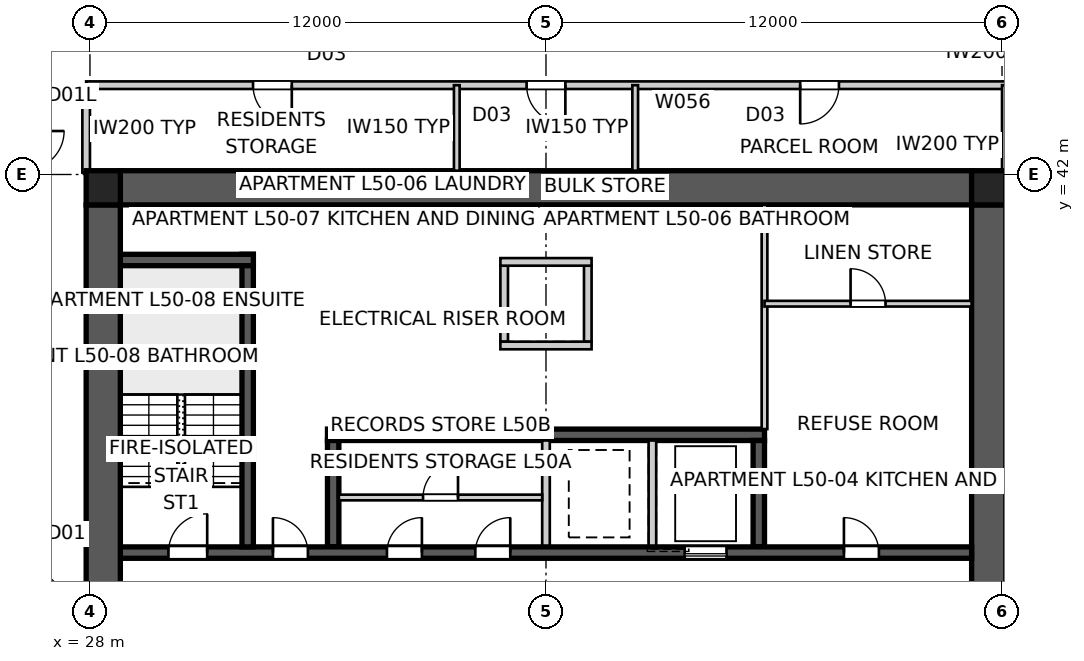
"""IFC4 building model, lengths in metres.
Left out: names, types, materials, properties, quantities, classifications, styles, units other than length and angle.
Written with IfcOpenShell. Run it as: python <this file> out.ifc"""

import sys

from ifc_helpers import new_model, si_unit, direction, frame, frame_2d, origin, origin_2d, place, context, subcontext, project, spatial, polyline, rectangle, outline, extrude, element, fill, save


model = new_model("IFC4")
c1 = context("Model", 3, precision=1e-05, world=origin(), true_north=direction((0.0, 1.0)))
c2 = subcontext(c1, "Body", "Model", "MODEL_VIEW")
j1 = project(units=[si_unit("LENGTHUNIT", "METRE"), si_unit("PLANEANGLEUNIT", "RADIAN")], contexts=[c1])
p1 = place(None, origin())
s1 = spatial("IfcSite", under=j1, at=p1, CompositionType="ELEMENT")
p2 = place(p1, origin())
s2 = spatial("IfcBuilding", under=s1, at=p2, CompositionType="ELEMENT")
p3 = place(p2, frame((0.0, 0.0, 182.8)))
s3 = spatial("IfcBuildingStorey", under=s2, at=p3, CompositionType="ELEMENT", Elevation=182.8)
p4 = place(p3, frame((28.8, 41.65, 0.0), z_axis=(0.0, 0.0, 1.0), x_axis=(1.0, 0.0, 0.0)))
e1 = element("IfcWall", 1, at=p4, inside=s3, PredefinedType="SHEAR", context=c2, shape_type="SweptSolid", body=[
    extrude(outline(polyline([(0.0, -0.45), (22.4, -0.45), (22.4, -0.025), (22.85, -0.025), (22.85, 0.025), (22.4, 0.025), (22.4, 0.45), (0.0, 0.45), (0.0, 0.025), (-0.45, 0.025), (-0.45, -0.025), (0.0, -0.025), (0.0, -0.45)])), origin(), (0.0, 0.0, 1.0), 3.4),
])
p5 = place(p3, frame((51.65, 18.8, 0.0), z_axis=(0.0, 0.0, 1.0), x_axis=(0.0, 1.0, 0.0)))
e2 = element("IfcWall", 2, at=p5, inside=s3, PredefinedType="SHEAR", context=c2, shape_type="SweptSolid", body=[
    extrude(outline(polyline([(0.0, -0.45), (22.4, -0.45), (22.4, -0.025), (22.85, -0.025), (22.85, 0.025), (22.4, 0.025), (22.4, 0.45), (0.0, 0.45), (0.0, 0.025), (-0.45, 0.025), (-0.45, -0.025), (0.0, -0.025), (0.0, -0.45)])), origin(), (0.0, 0.0, 1.0), 3.4),
])
p6 = place(p5, frame((11.14, 0.0, 0.0)))
e3 = element("IfcOpeningElement", 3, at=p6, cuts=e2, PredefinedType="OPENING", context=c2, shape_type="SweptSolid", body=[
    extrude(rectangle(XDim=1.02, YDim=2.4, at=frame_2d((0.51, 1.2))), frame((0.0, 0.46, 0.0), z_axis=(0.0, -1.0, 0.0), x_axis=(1.0, 0.0, 0.0)), (0.0, 0.0, 1.0), 0.92),
])
p7 = place(p3, frame((28.35, 41.2, 0.0), z_axis=(0.0, 0.0, 1.0), x_axis=(0.0, -1.0, 0.0)))
e4 = element("IfcWall", 4, at=p7, inside=s3, PredefinedType="SHEAR", context=c2, shape_type="SweptSolid", body=[
    extrude(outline(polyline([(0.0, -0.45), (22.4, -0.45), (22.4, -0.025), (22.85, -0.025), (22.85, 0.025), (22.4, 0.025), (22.4, 0.45), (0.0, 0.45), (0.0, 0.025), (-0.45, 0.025), (-0.45, -0.025), (0.0, -0.025), (0.0, -0.45)])), origin(), (0.0, 0.0, 1.0), 3.4),
])
p8 = place(p7, frame((11.14, 0.0, 0.0)))
e5 = element("IfcOpeningElement", 5, at=p8, cuts=e4, PredefinedType="OPENING", context=c2, shape_type="SweptSolid", body=[
    extrude(rectangle(XDim=1.02, YDim=2.4, at=frame_2d((0.51, 1.2))), frame((0.0, 0.46, 0.0), z_axis=(0.0, -1.0, 0.0), x_axis=(1.0, 0.0, 0.0)), (0.0, 0.0, 1.0), 0.92),
])
p9 = place(p3, frame((28.8, 32.05, 0.0), z_axis=(0.0, 0.0, 1.0), x_axis=(1.0, 0.0, 0.0)))
e6 = element("IfcWall", 6, at=p9, inside=s3, PredefinedType="SHEAR", context=c2, shape_type="SweptSolid", body=[
    extrude(rectangle(XDim=22.4, YDim=0.3, at=frame_2d((11.2, 0.0))), origin(), (0.0, 0.0, 1.0), 3.4),
])
p10 = place(p9, frame((19.04, 0.0, 0.0)))
e7 = element("IfcOpeningElement", 7, at=p10, cuts=e6, PredefinedType="OPENING", context=c2, shape_type="SweptSolid", body=[
    extrude(rectangle(XDim=0.92, YDim=2.1, at=frame_2d((0.46, 1.05))), frame((0.0, 0.16, 0.0), z_axis=(0.0, -1.0, 0.0), x_axis=(1.0, 0.0, 0.0)), (0.0, 0.0, 1.0), 0.32),
])
p11 = place(p9, frame((1.265, 0.0, 0.0)))
e8 = element("IfcOpeningElement", 8, at=p11, cuts=e6, PredefinedType="OPENING", context=c2, shape_type="SweptSolid", body=[
    extrude(rectangle(XDim=1.02, YDim=2.1, at=frame_2d((0.51, 1.05))), frame((0.0, 0.16, 0.0), z_axis=(0.0, -1.0, 0.0), x_axis=(1.0, 0.0, 0.0)), (0.0, 0.0, 1.0), 0.32),
])
p12 = place(p9, frame((4.015, 0.0, 0.0)))
e9 = element("IfcOpeningElement", 9, at=p12, cuts=e6, PredefinedType="OPENING", context=c2, shape_type="SweptSolid", body=[
    extrude(rectangle(XDim=0.92, YDim=2.1, at=frame_2d((0.46, 1.05))), frame((0.0, 0.16, 0.0), z_axis=(0.0, -1.0, 0.0), x_axis=(1.0, 0.0, 0.0)), (0.0, 0.0, 1.0), 0.32),
])
p13 = place(p9, frame((7.015, 0.0, 0.0)))
e10 = element("IfcOpeningElement", 10, at=p13, cuts=e6, PredefinedType="OPENING", context=c2, shape_type="SweptSolid", body=[
    extrude(rectangle(XDim=0.92, YDim=2.1, at=frame_2d((0.46, 1.05))), frame((0.0, 0.16, 0.0), z_axis=(0.0, -1.0, 0.0), x_axis=(1.0, 0.0, 0.0)), (0.0, 0.0, 1.0), 0.32),
])
p14 = place(p9, frame((9.34, 0.0, 0.0)))
e11 = element("IfcOpeningElement", 11, at=p14, cuts=e6, PredefinedType="OPENING", context=c2, shape_type="SweptSolid", body=[
    extrude(rectangle(XDim=0.92, YDim=2.1, at=frame_2d((0.46, 1.05))), frame((0.0, 0.16, 0.0), z_axis=(0.0, -1.0, 0.0), x_axis=(1.0, 0.0, 0.0)), (0.0, 0.0, 1.0), 0.32),
])
p15 = place(p9, frame((14.85, 0.0, 0.0)))
e12 = element("IfcOpeningElement", 12, at=p15, cuts=e6, PredefinedType="OPENING", context=c2, shape_type="SweptSolid", body=[
    extrude(rectangle(XDim=1.1, YDim=2.1, at=frame_2d((0.55, 1.05))), frame((0.0, 0.16, 0.0), z_axis=(0.0, -1.0, 0.0), x_axis=(1.0, 0.0, 0.0)), (0.0, 0.0, 1.0), 0.32),
])
p16 = place(p3, frame((34.25, 35.15, 0.0), z_axis=(0.0, 0.0, 1.0), x_axis=(1.0, 0.0, 0.0)))
e13 = element("IfcWall", 13, at=p16, inside=s3, PredefinedType="SHEAR", context=c2, shape_type="SweptSolid", body=[
    extrude(rectangle(XDim=11.5, YDim=0.3, at=frame_2d((5.75, 0.0))), origin(), (0.0, 0.0, 1.0), 3.4),
])
p17 = place(p3, frame((34.4, 32.2, 0.0), z_axis=(0.0, 0.0, 1.0), x_axis=(0.0, 1.0, 0.0)))
e14 = element("IfcWall", 14, at=p17, inside=s3, PredefinedType="SHEAR", context=c2, shape_type="SweptSolid", body=[
    extrude(rectangle(XDim=2.8, YDim=0.3, at=frame_2d((1.4, 0.0))), origin(), (0.0, 0.0, 1.0), 3.4),
])
for number, where, z_axis, x_axis in (
    (15, (40.0, 32.2, 0.0), (0.0, 0.0, 1.0), (0.0, 1.0, 0.0)),
    (16, (42.8, 32.2, 0.0), (0.0, 0.0, 1.0), (0.0, 1.0, 0.0)),
):
    element("IfcWall", number, at=place(p3, frame(where, z_axis=z_axis, x_axis=x_axis)), inside=s3, PredefinedType="SOLIDWALL", context=c2, shape_type="SweptSolid", body=[
        extrude(rectangle(XDim=2.8, YDim=0.2, at=frame_2d((1.4, 0.0))), origin(), (0.0, 0.0, 1.0), 3.4),
    ])
p18 = place(p3, frame((45.6, 32.2, 0.0), z_axis=(0.0, 0.0, 1.0), x_axis=(0.0, 1.0, 0.0)))
e17 = element("IfcWall", 17, at=p18, inside=s3, PredefinedType="SHEAR", context=c2, shape_type="SweptSolid", body=[
    extrude(rectangle(XDim=2.8, YDim=0.3, at=frame_2d((1.4, 0.0))), origin(), (0.0, 0.0, 1.0), 3.4),
])
p19 = place(p3, frame((32.15, 32.2, 0.0), z_axis=(0.0, 0.0, 1.0), x_axis=(0.0, 1.0, 0.0)))
e18 = element("IfcWall", 18, at=p19, inside=s3, PredefinedType="SHEAR", context=c2, shape_type="SweptSolid", body=[
    extrude(rectangle(XDim=7.7, YDim=0.3, at=frame_2d((3.85, 0.0))), origin(), (0.0, 0.0, 1.0), 3.4),
])
p20 = place(p3, frame((28.8, 39.75, 0.0), z_axis=(0.0, 0.0, 1.0), x_axis=(1.0, 0.0, 0.0)))
e19 = element("IfcWall", 19, at=p20, inside=s3, PredefinedType="SHEAR", context=c2, shape_type="SweptSolid", body=[
    extrude(rectangle(XDim=3.5, YDim=0.3, at=frame_2d((1.75, 0.0))), origin(), (0.0, 0.0, 1.0), 3.4),
])
for number, where, z_axis, x_axis in (
    (20, (38.9, 37.6, 0.0), (0.0, 0.0, 1.0), (0.0, 1.0, 0.0)),
    (21, (41.1, 37.6, 0.0), (0.0, 0.0, 1.0), (0.0, 1.0, 0.0)),
):
    element("IfcWall", number, at=place(p3, frame(where, z_axis=z_axis, x_axis=x_axis)), inside=s3, PredefinedType="SOLIDWALL", context=c2, shape_type="SweptSolid", body=[
        extrude(rectangle(XDim=2.0, YDim=0.2, at=frame_2d((1.0, 0.0))), origin(), (0.0, 0.0, 1.0), 3.4),
    ])
for number, where, z_axis, x_axis in (
    (22, (38.8, 37.5, 0.0), (0.0, 0.0, 1.0), (1.0, 0.0, 0.0)),
    (23, (38.8, 39.7, 0.0), (0.0, 0.0, 1.0), (1.0, 0.0, 0.0)),
):
    element("IfcWall", number, at=place(p3, frame(where, z_axis=z_axis, x_axis=x_axis)), inside=s3, PredefinedType="SOLIDWALL", context=c2, shape_type="SweptSolid", body=[
        extrude(rectangle(XDim=2.4, YDim=0.2, at=frame_2d((1.2, 0.0))), origin(), (0.0, 0.0, 1.0), 3.4),
    ])
for number, where, z_axis, x_axis in (
    (24, (51.65, 41.65, 0.0), (0.0, 0.0, 1.0), (1.0, 0.0, 0.0)),
    (25, (28.35, 41.65, 0.0), (0.0, 0.0, 1.0), (1.0, 0.0, 0.0)),
):
    element("IfcColumn", number, at=place(p3, frame(where, z_axis=z_axis, x_axis=x_axis)), inside=s3, PredefinedType="COLUMN", context=c2, shape_type="SweptSolid", body=[
        extrude(rectangle(XDim=0.9, YDim=0.9, at=origin_2d()), origin(), (0.0, 0.0, 1.0), 3.4),
    ])
p21 = place(p3, frame((45.75, 41.2, 0.0), z_axis=(0.0, 0.0, 1.0), x_axis=(0.0, -1.0, 0.0)))
e26 = element("IfcWall", 26, at=p21, inside=s3, PredefinedType="SOLIDWALL", context=c2, shape_type="SweptSolid", body=[
    extrude(rectangle(XDim=5.9, YDim=0.15, at=frame_2d((2.95, 0.0))), origin(), (0.0, 0.0, 1.0), 3.25),
])
p22 = place(p3, frame((45.75, 38.6, 0.0), z_axis=(0.0, 0.0, 1.0), x_axis=(1.0, 0.0, 0.0)))
e27 = element("IfcWall", 27, at=p22, inside=s3, PredefinedType="SOLIDWALL", context=c2, shape_type="SweptSolid", body=[
    extrude(rectangle(XDim=5.45, YDim=0.15, at=frame_2d((2.725, 0.0))), origin(), (0.0, 0.0, 1.0), 3.25),
])
p23 = place(p22, frame((2.265, 0.0, 0.0)))
e28 = element("IfcOpeningElement", 28, at=p23, cuts=e27, PredefinedType="OPENING", context=c2, shape_type="SweptSolid", body=[
    extrude(rectangle(XDim=0.92, YDim=2.1, at=frame_2d((0.46, 1.05))), frame((0.0, 0.085, 0.0), z_axis=(0.0, -1.0, 0.0), x_axis=(1.0, 0.0, 0.0)), (0.0, 0.0, 1.0), 0.17),
])
p24 = place(p3, frame((52.1, 44.35, 0.0), z_axis=(0.0, 0.0, 1.0), x_axis=(-1.0, 0.0, 0.0)))
e29 = element("IfcWall", 29, at=p24, inside=s3, PredefinedType="PARTITIONING", context=c2, shape_type="SweptSolid", body=[
    extrude(rectangle(XDim=24.2, YDim=0.2, at=frame_2d((12.1, 0.0))), origin(), (0.0, 0.0, 1.0), 3.25),
])
p25 = place(p24, frame((18.789, 0.0, 0.0)))
e30 = element("IfcOpeningElement", 30, at=p25, cuts=e29, PredefinedType="OPENING", context=c2, shape_type="SweptSolid", body=[
    extrude(rectangle(XDim=1.02, YDim=2.1, at=frame_2d((0.51, 1.05))), frame((0.0, 0.11, 0.0), z_axis=(0.0, -1.0, 0.0), x_axis=(1.0, 0.0, 0.0)), (0.0, 0.0, 1.0), 0.22),
])
p26 = place(p24, frame((4.391, 0.0, 0.0)))
e31 = element("IfcOpeningElement", 31, at=p26, cuts=e29, PredefinedType="OPENING", context=c2, shape_type="SweptSolid", body=[
    extrude(rectangle(XDim=1.02, YDim=2.1, at=frame_2d((0.51, 1.05))), frame((0.0, 0.11, 0.0), z_axis=(0.0, -1.0, 0.0), x_axis=(1.0, 0.0, 0.0)), (0.0, 0.0, 1.0), 0.22),
])
p27 = place(p24, frame((11.59, 0.0, 0.0)))
e32 = element("IfcOpeningElement", 32, at=p27, cuts=e29, PredefinedType="OPENING", context=c2, shape_type="SweptSolid", body=[
    extrude(rectangle(XDim=1.02, YDim=2.1, at=frame_2d((0.51, 1.05))), frame((0.0, 0.11, 0.0), z_axis=(0.0, -1.0, 0.0), x_axis=(1.0, 0.0, 0.0)), (0.0, 0.0, 1.0), 0.22),
])
p28 = place(p3, frame((27.9, 44.35, 0.0), z_axis=(0.0, 0.0, 1.0), x_axis=(0.0, -1.0, 0.0)))
e33 = element("IfcWall", 33, at=p28, inside=s3, PredefinedType="PARTITIONING", context=c2, shape_type="SweptSolid", body=[
    extrude(rectangle(XDim=2.3, YDim=0.2, at=frame_2d((1.15, 0.0))), origin(), (0.0, 0.0, 1.0), 3.25),
])
p29 = place(p3, frame((52.1, 41.18, 0.0), z_axis=(0.0, 0.0, 1.0), x_axis=(0.0, 1.0, 0.0)))
e34 = element("IfcWall", 34, at=p29, inside=s3, PredefinedType="PARTITIONING", context=c2, shape_type="SweptSolid", body=[
    extrude(rectangle(XDim=3.17, YDim=0.2, at=frame_2d((1.585, 0.0))), origin(), (0.0, 0.0, 1.0), 3.25),
])
for number, where, z_axis, x_axis in (
    (35, (37.653, 42.1, 0.0), (0.0, 0.0, 1.0), (0.0, 1.0, 0.0)),
    (36, (42.347, 42.1, 0.0), (0.0, 0.0, 1.0), (0.0, 1.0, 0.0)),
):
    element("IfcWall", number, at=place(p3, frame(where, z_axis=z_axis, x_axis=x_axis)), inside=s3, PredefinedType="SOLIDWALL", context=c2, shape_type="SweptSolid", body=[
        extrude(rectangle(XDim=2.25, YDim=0.15, at=frame_2d((1.125, 0.0))), origin(), (0.0, 0.0, 1.0), 3.25),
    ])
p30 = place(p3, frame((34.55, 33.5, 0.0), z_axis=(0.0, 0.0, 1.0), x_axis=(1.0, 0.0, 0.0)))
e37 = element("IfcWall", 37, at=p30, inside=s3, PredefinedType="SOLIDWALL", context=c2, shape_type="SweptSolid", body=[
    extrude(rectangle(XDim=5.35, YDim=0.15, at=frame_2d((2.675, 0.0))), origin(), (0.0, 0.0, 1.0), 3.25),
])
p31 = place(p30, frame((2.215, 0.0, 0.0)))
e38 = element("IfcOpeningElement", 38, at=p31, cuts=e37, PredefinedType="OPENING", context=c2, shape_type="SweptSolid", body=[
    extrude(rectangle(XDim=0.92, YDim=2.1, at=frame_2d((0.46, 1.05))), frame((0.0, 0.085, 0.0), z_axis=(0.0, -1.0, 0.0), x_axis=(1.0, 0.0, 0.0)), (0.0, 0.0, 1.0), 0.17),
])
p32 = place(p10, origin())
e39 = element("IfcDoor", 39, at=p32, inside=s3, OperationType="SINGLE_SWING_LEFT", PredefinedType="DOOR", context=c2, shape_type="SweptSolid", body=[
    extrude(rectangle(XDim=0.92, YDim=2.1, at=frame_2d((0.46, 1.05))), frame((0.0, 0.025, 0.0), z_axis=(0.0, -1.0, 0.0), x_axis=(1.0, 0.0, 0.0)), (0.0, 0.0, 1.0), 0.05),
])
fill(e7, e39)
p33 = place(p11, origin())
e40 = element("IfcDoor", 40, at=p33, inside=s3, OperationType="SINGLE_SWING_RIGHT", PredefinedType="DOOR", context=c2, shape_type="SweptSolid", body=[
    extrude(rectangle(XDim=1.02, YDim=2.1, at=frame_2d((0.51, 1.05))), frame((0.0, 0.025, 0.0), z_axis=(0.0, -1.0, 0.0), x_axis=(1.0, 0.0, 0.0)), (0.0, 0.0, 1.0), 0.05),
])
fill(e8, e40)
p34 = place(p12, origin())
e41 = element("IfcDoor", 41, at=p34, inside=s3, OperationType="SINGLE_SWING_LEFT", PredefinedType="DOOR", context=c2, shape_type="SweptSolid", body=[
    extrude(rectangle(XDim=0.92, YDim=2.1, at=frame_2d((0.46, 1.05))), frame((0.0, 0.025, 0.0), z_axis=(0.0, -1.0, 0.0), x_axis=(1.0, 0.0, 0.0)), (0.0, 0.0, 1.0), 0.05),
])
fill(e9, e41)
p35 = place(p25, origin())
e42 = element("IfcDoor", 42, at=p35, inside=s3, OperationType="SINGLE_SWING_LEFT", PredefinedType="DOOR", context=c2, shape_type="SweptSolid", body=[
    extrude(rectangle(XDim=1.02, YDim=2.1, at=frame_2d((0.51, 1.05))), frame((0.0, 0.025, 0.0), z_axis=(0.0, -1.0, 0.0), x_axis=(1.0, 0.0, 0.0)), (0.0, 0.0, 1.0), 0.05),
])
fill(e30, e42)
p36 = place(p26, origin())
e43 = element("IfcDoor", 43, at=p36, inside=s3, OperationType="SINGLE_SWING_RIGHT", PredefinedType="DOOR", context=c2, shape_type="SweptSolid", body=[
    extrude(rectangle(XDim=1.02, YDim=2.1, at=frame_2d((0.51, 1.05))), frame((0.0, 0.025, 0.0), z_axis=(0.0, -1.0, 0.0), x_axis=(1.0, 0.0, 0.0)), (0.0, 0.0, 1.0), 0.05),
])
fill(e31, e43)
p37 = place(p27, origin())
e44 = element("IfcDoor", 44, at=p37, inside=s3, OperationType="SINGLE_SWING_LEFT", PredefinedType="DOOR", context=c2, shape_type="SweptSolid", body=[
    extrude(rectangle(XDim=1.02, YDim=2.1, at=frame_2d((0.51, 1.05))), frame((0.0, 0.025, 0.0), z_axis=(0.0, -1.0, 0.0), x_axis=(1.0, 0.0, 0.0)), (0.0, 0.0, 1.0), 0.05),
])
fill(e32, e44)
p38 = place(p23, origin())
e45 = element("IfcDoor", 45, at=p38, inside=s3, OperationType="SINGLE_SWING_LEFT", PredefinedType="DOOR", context=c2, shape_type="SweptSolid", body=[
    extrude(rectangle(XDim=0.92, YDim=2.1, at=frame_2d((0.46, 1.05))), frame((0.0, 0.025, 0.0), z_axis=(0.0, -1.0, 0.0), x_axis=(1.0, 0.0, 0.0)), (0.0, 0.0, 1.0), 0.05),
])
fill(e28, e45)
p39 = place(p13, origin())
e46 = element("IfcDoor", 46, at=p39, inside=s3, OperationType="SINGLE_SWING_RIGHT", PredefinedType="DOOR", context=c2, shape_type="SweptSolid", body=[
    extrude(rectangle(XDim=0.92, YDim=2.1, at=frame_2d((0.46, 1.05))), frame((0.0, 0.025, 0.0), z_axis=(0.0, -1.0, 0.0), x_axis=(1.0, 0.0, 0.0)), (0.0, 0.0, 1.0), 0.05),
])
fill(e10, e46)
p40 = place(p14, origin())
e47 = element("IfcDoor", 47, at=p40, inside=s3, OperationType="SINGLE_SWING_RIGHT", PredefinedType="DOOR", context=c2, shape_type="SweptSolid", body=[
    extrude(rectangle(XDim=0.92, YDim=2.1, at=frame_2d((0.46, 1.05))), frame((0.0, 0.025, 0.0), z_axis=(0.0, -1.0, 0.0), x_axis=(1.0, 0.0, 0.0)), (0.0, 0.0, 1.0), 0.05),
])
fill(e11, e47)
p41 = place(p31, origin())
e48 = element("IfcDoor", 48, at=p41, inside=s3, OperationType="SINGLE_SWING_RIGHT", PredefinedType="DOOR", context=c2, shape_type="SweptSolid", body=[
    extrude(rectangle(XDim=0.92, YDim=2.1, at=frame_2d((0.46, 1.05))), frame((0.0, 0.025, 0.0), z_axis=(0.0, -1.0, 0.0), x_axis=(1.0, 0.0, 0.0)), (0.0, 0.0, 1.0), 0.05),
])
fill(e38, e48)
p42 = place(p15, origin())
e49 = element("IfcDoor", 49, at=p42, inside=s3, OperationType="SLIDING_TO_LEFT", PredefinedType="DOOR", context=c2, shape_type="SweptSolid", body=[
    extrude(rectangle(XDim=1.1, YDim=2.1, at=frame_2d((0.55, 1.05))), frame((0.0, 0.025, 0.0), z_axis=(0.0, -1.0, 0.0), x_axis=(1.0, 0.0, 0.0)), (0.0, 0.0, 1.0), 0.05),
])
fill(e12, e49)
save(model, sys.argv[1])
